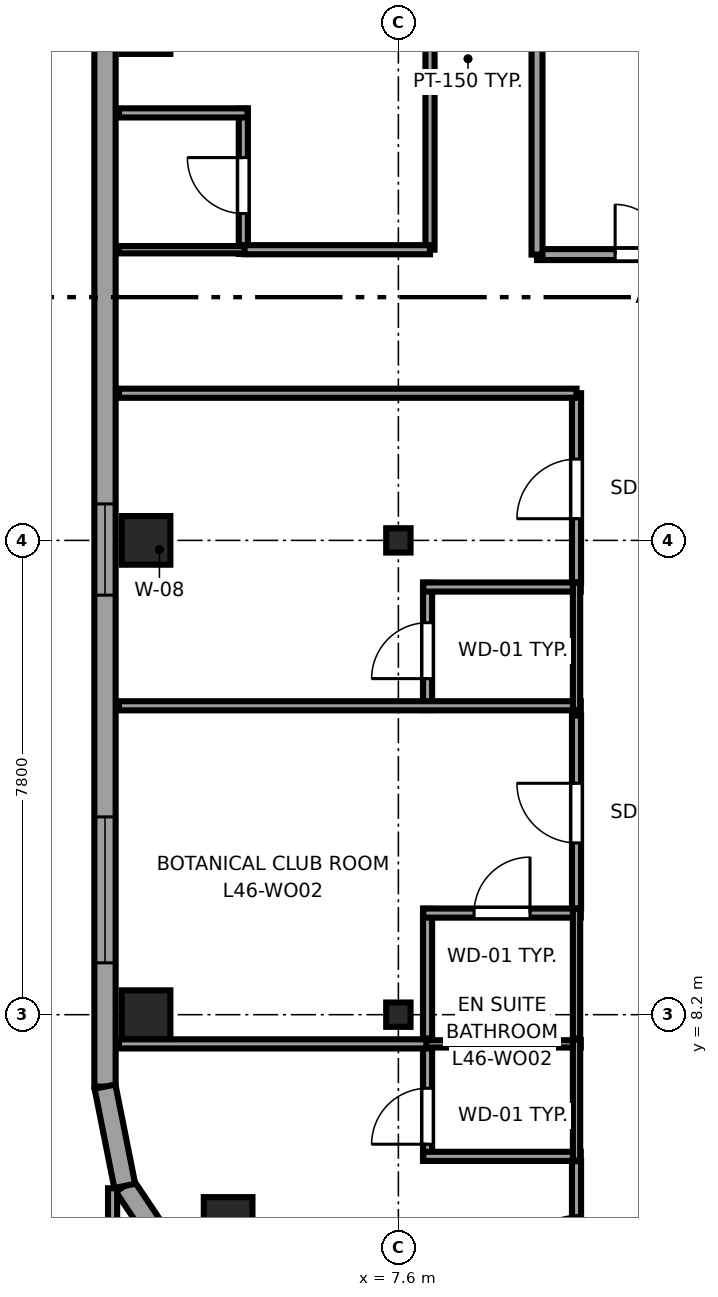
"""IFC4 building model, lengths in metres.
Left out: names, types, materials, properties, quantities, classifications, styles, units other than length and angle.
Written with IfcOpenShell. Run it as: python <this file> out.ifc"""

import sys

from ifc_helpers import new_model, si_unit, direction, frame, frame_2d, origin, origin_2d, place, context, subcontext, project, spatial, rectangle, i_section, extrude, source, transform, mapped, element, fill, save


model = new_model("IFC4")
c1 = context("Model", 3, precision=1e-05, world=origin(), true_north=direction((0.0, 1.0)))
c2 = subcontext(c1, "Body", "Model", "MODEL_VIEW")
j1 = project(units=[si_unit("LENGTHUNIT", "METRE"), si_unit("PLANEANGLEUNIT", "RADIAN")], contexts=[c1])
p1 = place(None, origin())
s1 = spatial("IfcSite", under=j1, at=p1, CompositionType="ELEMENT")
p2 = place(p1, origin())
s2 = spatial("IfcBuilding", under=s1, at=p2, CompositionType="ELEMENT")
p3 = place(p2, frame((0.0, 0.0, 175.45)))
s3 = spatial("IfcBuildingStorey", under=s2, at=p3, CompositionType="ELEMENT", Elevation=175.45)
m1 = source(origin(), c2, "Body", "SweptSolid", [
    extrude(rectangle(XDim=0.8, YDim=0.8, at=origin_2d()), origin(), (0.0, 0.0, 1.0), 3.55),
])
for number, where, z_axis, x_axis in (
    (1, (4.8, 4.8, 0.0), (0.0, 0.0, 1.0), (1.0, 0.0, 0.0)),
    (2, (3.45, 8.2, 0.0), (0.0, 0.0, 1.0), (1.0, 0.0, 0.0)),
    (3, (3.45, 16.0, 0.0), (0.0, 0.0, 1.0), (1.0, 0.0, 0.0)),
    (4, (3.45, 24.4, 0.0), (0.0, 0.0, 1.0), (1.0, 0.0, 0.0)),
):
    element("IfcColumn", number, at=place(p3, frame(where, z_axis=z_axis, x_axis=x_axis)), inside=s3, PredefinedType="COLUMN", context=c2, shape_type="MappedRepresentation", body=[
        mapped(m1, transform((0.0, 0.0, 0.0), x_axis=(1.0, 0.0, 0.0), y_axis=(0.0, 1.0, 0.0), z_axis=(0.0, 0.0, 1.0), scale=1.0)),
    ])
m2 = source(origin(), c2, "Body", "SweptSolid", [
    extrude(i_section(OverallWidth=0.4, OverallDepth=0.4, WebThickness=0.02, FlangeThickness=0.035, at=origin_2d()), origin(), (0.0, 0.0, 1.0), 3.55),
])
for number, where, z_axis, x_axis in (
    (5, (7.6, 8.2, 0.0), (0.0, 0.0, 1.0), (1.0, 0.0, 0.0)),
    (6, (7.6, 16.0, 0.0), (0.0, 0.0, 1.0), (1.0, 0.0, 0.0)),
):
    element("IfcColumn", number, at=place(p3, frame(where, z_axis=z_axis, x_axis=x_axis)), inside=s3, PredefinedType="COLUMN", context=c2, shape_type="MappedRepresentation", body=[
        mapped(m2, transform((0.0, 0.0, 0.0), x_axis=(1.0, 0.0, 0.0), y_axis=(0.0, 1.0, 0.0), z_axis=(0.0, 0.0, 1.0), scale=1.0)),
    ])
p4 = place(p3, frame((3.1, 5.385, 0.0), z_axis=(0.0, 0.0, 1.0), x_axis=(0.555623290322, -0.831434158098, 0.0)))
e7 = element("IfcWall", 7, at=p4, inside=s3, PredefinedType="SOLIDWALL", context=c2, shape_type="SweptSolid", body=[
    extrude(rectangle(XDim=1.647, YDim=0.35, at=frame_2d((0.824, 0.0))), origin(), (0.0, 0.0, 1.0), 2.832),
])
p5 = place(p3, frame((2.775, 41.583, 0.0), z_axis=(0.0, 0.0, 1.0), x_axis=(0.0, -1.0, 0.0)))
e8 = element("IfcWall", 8, at=p5, inside=s3, PredefinedType="SOLIDWALL", context=c2, shape_type="SweptSolid", body=[
    extrude(rectangle(XDim=34.566, YDim=0.35, at=frame_2d((17.283, 0.0))), origin(), (0.0, 0.0, 1.0), 3.37),
])
p6 = place(p5, frame((1.485, 0.0, 0.68)))
e9 = element("IfcOpeningElement", 9, at=p6, cuts=e8, PredefinedType="OPENING", context=c2, shape_type="SweptSolid", body=[
    extrude(rectangle(XDim=2.4, YDim=1.9, at=frame_2d((1.2, 0.95))), frame((0.0, 0.185, 0.0), z_axis=(0.0, -1.0, 0.0), x_axis=(1.0, 0.0, 0.0)), (0.0, 0.0, 1.0), 0.37),
])
p7 = place(p5, frame((9.827, 0.0, 0.68)))
e10 = element("IfcOpeningElement", 10, at=p7, cuts=e8, PredefinedType="OPENING", context=c2, shape_type="SweptSolid", body=[
    extrude(rectangle(XDim=2.4, YDim=1.9, at=frame_2d((1.2, 0.95))), frame((0.0, 0.185, 0.0), z_axis=(0.0, -1.0, 0.0), x_axis=(1.0, 0.0, 0.0)), (0.0, 0.0, 1.0), 0.37),
])
p8 = place(p5, frame((13.997, 0.0, 0.68)))
e11 = element("IfcOpeningElement", 11, at=p8, cuts=e8, PredefinedType="OPENING", context=c2, shape_type="SweptSolid", body=[
    extrude(rectangle(XDim=2.4, YDim=1.9, at=frame_2d((1.2, 0.95))), frame((0.0, 0.185, 0.0), z_axis=(0.0, -1.0, 0.0), x_axis=(1.0, 0.0, 0.0)), (0.0, 0.0, 1.0), 0.37),
])
p9 = place(p5, frame((30.13, 0.0, 0.68)))
e12 = element("IfcOpeningElement", 12, at=p9, cuts=e8, PredefinedType="OPENING", context=c2, shape_type="SweptSolid", body=[
    extrude(rectangle(XDim=2.4, YDim=1.9, at=frame_2d((1.2, 0.95))), frame((0.0, 0.185, 0.0), z_axis=(0.0, -1.0, 0.0), x_axis=(1.0, 0.0, 0.0)), (0.0, 0.0, 1.0), 0.37),
])
p10 = place(p5, frame((24.983, 0.0, 0.62)))
e13 = element("IfcOpeningElement", 13, at=p10, cuts=e8, PredefinedType="OPENING", context=c2, shape_type="SweptSolid", body=[
    extrude(rectangle(XDim=1.5, YDim=1.55, at=frame_2d((0.75, 0.775))), frame((0.0, 0.185, 0.0), z_axis=(0.0, -1.0, 0.0), x_axis=(1.0, 0.0, 0.0)), (0.0, 0.0, 1.0), 0.37),
])
p11 = place(p3, frame((2.775, 7.017, 0.0), z_axis=(0.0, 0.0, 1.0), x_axis=(0.195072403631, -0.980788844421, 0.0)))
e14 = element("IfcWall", 14, at=p11, inside=s3, PredefinedType="SOLIDWALL", context=c2, shape_type="SweptSolid", body=[
    extrude(rectangle(XDim=1.665, YDim=0.35, at=frame_2d((0.832, 0.0))), origin(), (0.0, 0.0, 1.0), 3.37),
])
p12 = place(p3, frame((8.08, 5.8, 0.0), z_axis=(0.0, 0.0, 1.0), x_axis=(0.0, 1.0, 0.0)))
e15 = element("IfcWall", 15, at=p12, inside=s3, PredefinedType="PARTITIONING", context=c2, shape_type="SweptSolid", body=[
    extrude(rectangle(XDim=1.99, YDim=0.15, at=frame_2d((0.995, 0.0))), origin(), (0.0, 0.0, 1.0), 3.37),
])
p13 = place(p12, frame((0.27, 0.0, 0.0)))
e16 = element("IfcOpeningElement", 16, at=p13, cuts=e15, PredefinedType="OPENING", context=c2, shape_type="SweptSolid", body=[
    extrude(rectangle(XDim=0.92, YDim=2.01, at=frame_2d((0.46, 1.005))), frame((0.0, 0.085, 0.0), z_axis=(0.0, -1.0, 0.0), x_axis=(1.0, 0.0, 0.0)), (0.0, 0.0, 1.0), 0.17),
])
p14 = place(p3, frame((8.01, 5.87, 0.0), z_axis=(0.0, 0.0, 1.0), x_axis=(1.0, 0.0, 0.0)))
e17 = element("IfcWall", 17, at=p14, inside=s3, PredefinedType="PARTITIONING", context=c2, shape_type="SweptSolid", body=[
    extrude(rectangle(XDim=2.59, YDim=0.15, at=frame_2d((1.295, 0.0))), origin(), (0.0, 0.0, 1.0), 3.37),
])
p15 = place(p3, frame((8.01, 7.72, 0.0), z_axis=(0.0, 0.0, 1.0), x_axis=(1.0, 0.0, 0.0)))
e18 = element("IfcWall", 18, at=p15, inside=s3, PredefinedType="PLUMBINGWALL", context=c2, shape_type="SweptSolid", body=[
    extrude(rectangle(XDim=2.59, YDim=0.12, at=frame_2d((1.295, 0.0))), origin(), (0.0, 0.0, 1.0), 3.37),
])
p16 = place(p3, frame((10.53, 5.8, 0.0), z_axis=(0.0, 0.0, 1.0), x_axis=(0.0, 1.0, 0.0)))
e19 = element("IfcWall", 19, at=p16, inside=s3, PredefinedType="PLUMBINGWALL", context=c2, shape_type="SweptSolid", body=[
    extrude(rectangle(XDim=1.99, YDim=0.12, at=frame_2d((0.995, 0.0))), origin(), (0.0, 0.0, 1.0), 3.37),
])
p17 = place(p3, frame((8.08, 7.81, 0.0), z_axis=(0.0, 0.0, 1.0), x_axis=(0.0, 1.0, 0.0)))
e20 = element("IfcWall", 20, at=p17, inside=s3, PredefinedType="PARTITIONING", context=c2, shape_type="SweptSolid", body=[
    extrude(rectangle(XDim=2.131, YDim=0.15, at=frame_2d((1.065, 0.0))), origin(), (0.0, 0.0, 1.0), 3.37),
])
p18 = place(p3, frame((8.01, 9.871, 0.0), z_axis=(0.0, 0.0, 1.0), x_axis=(1.0, 0.0, 0.0)))
e21 = element("IfcWall", 21, at=p18, inside=s3, PredefinedType="PARTITIONING", context=c2, shape_type="SweptSolid", body=[
    extrude(rectangle(XDim=2.59, YDim=0.15, at=frame_2d((1.295, 0.0))), origin(), (0.0, 0.0, 1.0), 3.37),
])
p19 = place(p18, frame((0.835, 0.0, 0.0)))
e22 = element("IfcOpeningElement", 22, at=p19, cuts=e21, PredefinedType="OPENING", context=c2, shape_type="SweptSolid", body=[
    extrude(rectangle(XDim=0.92, YDim=2.01, at=frame_2d((0.46, 1.005))), frame((0.0, 0.085, 0.0), z_axis=(0.0, -1.0, 0.0), x_axis=(1.0, 0.0, 0.0)), (0.0, 0.0, 1.0), 0.17),
])
p20 = place(p3, frame((10.53, 7.81, 0.0), z_axis=(0.0, 0.0, 1.0), x_axis=(0.0, 1.0, 0.0)))
e23 = element("IfcWall", 23, at=p20, inside=s3, PredefinedType="PLUMBINGWALL", context=c2, shape_type="SweptSolid", body=[
    extrude(rectangle(XDim=2.131, YDim=0.12, at=frame_2d((1.065, 0.0))), origin(), (0.0, 0.0, 1.0), 3.37),
])
p21 = place(p3, frame((8.08, 13.21, 0.0), z_axis=(0.0, 0.0, 1.0), x_axis=(0.0, 1.0, 0.0)))
e24 = element("IfcWall", 24, at=p21, inside=s3, PredefinedType="PARTITIONING", context=c2, shape_type="SweptSolid", body=[
    extrude(rectangle(XDim=2.093, YDim=0.15, at=frame_2d((1.046, 0.0))), origin(), (0.0, 0.0, 1.0), 3.37),
])
p22 = place(p21, frame((0.517, 0.0, 0.0)))
e25 = element("IfcOpeningElement", 25, at=p22, cuts=e24, PredefinedType="OPENING", context=c2, shape_type="SweptSolid", body=[
    extrude(rectangle(XDim=0.92, YDim=2.01, at=frame_2d((0.46, 1.005))), frame((0.0, 0.085, 0.0), z_axis=(0.0, -1.0, 0.0), x_axis=(1.0, 0.0, 0.0)), (0.0, 0.0, 1.0), 0.17),
])
p23 = place(p3, frame((3.005, 13.28, 0.0), z_axis=(0.0, 0.0, 1.0), x_axis=(1.0, 0.0, 0.0)))
e26 = element("IfcWall", 26, at=p23, inside=s3, PredefinedType="PARTITIONING", context=c2, shape_type="SweptSolid", body=[
    extrude(rectangle(XDim=7.595, YDim=0.15, at=frame_2d((3.798, 0.0))), origin(), (0.0, 0.0, 1.0), 3.37),
])
p24 = place(p3, frame((8.01, 15.233, 0.0), z_axis=(0.0, 0.0, 1.0), x_axis=(1.0, 0.0, 0.0)))
e27 = element("IfcWall", 27, at=p24, inside=s3, PredefinedType="PARTITIONING", context=c2, shape_type="SweptSolid", body=[
    extrude(rectangle(XDim=2.59, YDim=0.15, at=frame_2d((1.295, 0.0))), origin(), (0.0, 0.0, 1.0), 3.37),
])
p25 = place(p3, frame((10.53, 13.21, 0.0), z_axis=(0.0, 0.0, 1.0), x_axis=(0.0, 1.0, 0.0)))
e28 = element("IfcWall", 28, at=p25, inside=s3, PredefinedType="PLUMBINGWALL", context=c2, shape_type="SweptSolid", body=[
    extrude(rectangle(XDim=2.093, YDim=0.12, at=frame_2d((1.046, 0.0))), origin(), (0.0, 0.0, 1.0), 3.37),
])
p26 = place(p3, frame((5.05, 20.71, 0.0), z_axis=(0.0, 0.0, 1.0), x_axis=(0.0, 1.0, 0.0)))
e29 = element("IfcWall", 29, at=p26, inside=s3, PredefinedType="PARTITIONING", context=c2, shape_type="SweptSolid", body=[
    extrude(rectangle(XDim=2.39, YDim=0.15, at=frame_2d((1.195, 0.0))), origin(), (0.0, 0.0, 1.0), 3.37),
])
p27 = place(p26, frame((0.665, 0.0, 0.0)))
e30 = element("IfcOpeningElement", 30, at=p27, cuts=e29, PredefinedType="OPENING", context=c2, shape_type="SweptSolid", body=[
    extrude(rectangle(XDim=0.92, YDim=2.01, at=frame_2d((0.46, 1.005))), frame((0.0, 0.085, 0.0), z_axis=(0.0, -1.0, 0.0), x_axis=(1.0, 0.0, 0.0)), (0.0, 0.0, 1.0), 0.17),
])
p28 = place(p3, frame((3.005, 20.78, 0.0), z_axis=(0.0, 0.0, 1.0), x_axis=(1.0, 0.0, 0.0)))
e31 = element("IfcWall", 31, at=p28, inside=s3, PredefinedType="PLUMBINGWALL", context=c2, shape_type="SweptSolid", body=[
    extrude(rectangle(XDim=2.115, YDim=0.12, at=frame_2d((1.058, 0.0))), origin(), (0.0, 0.0, 1.0), 3.37),
])
p29 = place(p3, frame((3.005, 23.03, 0.0), z_axis=(0.0, 0.0, 1.0), x_axis=(1.0, 0.0, 0.0)))
e32 = element("IfcWall", 32, at=p29, inside=s3, PredefinedType="PARTITIONING", context=c2, shape_type="SweptSolid", body=[
    extrude(rectangle(XDim=2.115, YDim=0.15, at=frame_2d((1.058, 0.0))), origin(), (0.0, 0.0, 1.0), 3.37),
])
p30 = place(p3, frame((10.53, 3.005, 0.0), z_axis=(0.0, 0.0, 1.0), x_axis=(0.0, 1.0, 0.0)))
e33 = element("IfcWall", 33, at=p30, inside=s3, PredefinedType="PARTITIONING", context=c2, shape_type="SweptSolid", body=[
    extrude(rectangle(XDim=2.785, YDim=0.15, at=frame_2d((1.393, 0.0))), origin(), (0.0, 0.0, 1.0), 3.37),
])
p31 = place(p30, frame((0.91, 0.0, 0.0)))
e34 = element("IfcOpeningElement", 34, at=p31, cuts=e33, PredefinedType="OPENING", context=c2, shape_type="SweptSolid", body=[
    extrude(rectangle(XDim=0.98, YDim=2.12, at=frame_2d((0.49, 1.06))), frame((0.0, 0.085, 0.0), z_axis=(0.0, -1.0, 0.0), x_axis=(1.0, 0.0, 0.0)), (0.0, 0.0, 1.0), 0.17),
])
p32 = place(p3, frame((3.005, 7.72, 0.0), z_axis=(0.0, 0.0, 1.0), x_axis=(1.0, 0.0, 0.0)))
e35 = element("IfcWall", 35, at=p32, inside=s3, PredefinedType="PARTITIONING", context=c2, shape_type="SweptSolid", body=[
    extrude(rectangle(XDim=5.055, YDim=0.15, at=frame_2d((2.528, 0.0))), origin(), (0.0, 0.0, 1.0), 3.37),
])
p33 = place(p3, frame((2.9, 3.08, 0.0), z_axis=(0.0, 0.0, 1.0), x_axis=(0.0, 1.0, 0.0)))
e36 = element("IfcWall", 36, at=p33, inside=s3, PredefinedType="PARTITIONING", context=c2, shape_type="SweptSolid", body=[
    extrude(rectangle(XDim=2.265, YDim=0.15, at=frame_2d((1.132, 0.0))), origin(), (0.0, 0.0, 1.0), 3.37),
])
p34 = place(p3, frame((10.53, 9.951, 0.0), z_axis=(0.0, 0.0, 1.0), x_axis=(0.0, 1.0, 0.0)))
e37 = element("IfcWall", 37, at=p34, inside=s3, PredefinedType="PARTITIONING", context=c2, shape_type="SweptSolid", body=[
    extrude(rectangle(XDim=3.169, YDim=0.15, at=frame_2d((1.584, 0.0))), origin(), (0.0, 0.0, 1.0), 3.37),
])
p35 = place(p34, frame((1.074, 0.0, 0.0)))
e38 = element("IfcOpeningElement", 38, at=p35, cuts=e37, PredefinedType="OPENING", context=c2, shape_type="SweptSolid", body=[
    extrude(rectangle(XDim=0.98, YDim=2.12, at=frame_2d((0.49, 1.06))), frame((0.0, 0.085, 0.0), z_axis=(0.0, -1.0, 0.0), x_axis=(1.0, 0.0, 0.0)), (0.0, 0.0, 1.0), 0.17),
])
p36 = place(p3, frame((10.53, 15.313, 0.0), z_axis=(0.0, 0.0, 1.0), x_axis=(0.0, 1.0, 0.0)))
e39 = element("IfcWall", 39, at=p36, inside=s3, PredefinedType="PARTITIONING", context=c2, shape_type="SweptSolid", body=[
    extrude(rectangle(XDim=3.107, YDim=0.15, at=frame_2d((1.553, 0.0))), origin(), (0.0, 0.0, 1.0), 3.37),
])
p37 = place(p36, frame((1.043, 0.0, 0.0)))
e40 = element("IfcOpeningElement", 40, at=p37, cuts=e39, PredefinedType="OPENING", context=c2, shape_type="SweptSolid", body=[
    extrude(rectangle(XDim=0.98, YDim=2.12, at=frame_2d((0.49, 1.06))), frame((0.0, 0.085, 0.0), z_axis=(0.0, -1.0, 0.0), x_axis=(1.0, 0.0, 0.0)), (0.0, 0.0, 1.0), 0.17),
])
p38 = place(p3, frame((3.005, 18.42, 0.0), z_axis=(0.0, 0.0, 1.0), x_axis=(1.0, 0.0, 0.0)))
e41 = element("IfcWall", 41, at=p38, inside=s3, PredefinedType="PARTITIONING", context=c2, shape_type="SweptSolid", body=[
    extrude(rectangle(XDim=7.525, YDim=0.15, at=frame_2d((3.763, 0.0))), origin(), (0.0, 0.0, 1.0), 3.37),
])
p39 = place(p3, frame((8.12, 20.78, 0.0), z_axis=(0.0, 0.0, 1.0), x_axis=(0.0, 1.0, 0.0)))
e42 = element("IfcWall", 42, at=p39, inside=s3, PredefinedType="PARTITIONING", context=c2, shape_type="SweptSolid", body=[
    extrude(rectangle(XDim=13.54, YDim=0.15, at=frame_2d((6.77, 0.0))), origin(), (0.0, 0.0, 1.0), 3.37),
])
p40 = place(p39, frame((6.28, 0.0, 0.0)))
e43 = element("IfcOpeningElement", 43, at=p40, cuts=e42, PredefinedType="OPENING", context=c2, shape_type="SweptSolid", body=[
    extrude(rectangle(XDim=0.98, YDim=2.12, at=frame_2d((0.49, 1.06))), frame((0.0, 0.085, 0.0), z_axis=(0.0, -1.0, 0.0), x_axis=(1.0, 0.0, 0.0)), (0.0, 0.0, 1.0), 0.17),
])
p41 = place(p3, frame((5.07, 20.78, 0.0), z_axis=(0.0, 0.0, 1.0), x_axis=(1.0, 0.0, 0.0)))
e44 = element("IfcWall", 44, at=p41, inside=s3, PredefinedType="PARTITIONING", context=c2, shape_type="SweptSolid", body=[
    extrude(rectangle(XDim=3.05, YDim=0.15, at=frame_2d((1.525, 0.0))), origin(), (0.0, 0.0, 1.0), 3.37),
])
p42 = place(p3, frame((9.88, 20.7, 0.0), z_axis=(0.0, 0.0, 1.0), x_axis=(1.0, 0.0, 0.0)))
e45 = element("IfcWall", 45, at=p42, inside=s3, PredefinedType="PARTITIONING", context=c2, shape_type="SweptSolid", body=[
    extrude(rectangle(XDim=4.22, YDim=0.18, at=frame_2d((2.11, 0.0))), origin(), (0.0, 0.0, 1.0), 3.37),
])
p43 = place(p42, frame((1.285, 0.0, 0.0)))
e46 = element("IfcOpeningElement", 46, at=p43, cuts=e45, PredefinedType="OPENING", context=c2, shape_type="SweptSolid", body=[
    extrude(rectangle(XDim=1.65, YDim=2.15, at=frame_2d((0.825, 1.075))), frame((0.0, 0.1, 0.0), z_axis=(0.0, -1.0, 0.0), x_axis=(1.0, 0.0, 0.0)), (0.0, 0.0, 1.0), 0.2),
])
p44 = place(p3, frame((9.88, 20.7, 0.0), z_axis=(0.0, 0.0, 1.0), x_axis=(0.0, 1.0, 0.0)))
e47 = element("IfcWall", 47, at=p44, inside=s3, PredefinedType="PARTITIONING", context=c2, shape_type="SweptSolid", body=[
    extrude(rectangle(XDim=9.05, YDim=0.18, at=frame_2d((4.525, 0.0))), origin(), (0.0, 0.0, 1.0), 3.37),
])
m3 = source(origin(), c2, "Body", "SweptSolid", [
    extrude(rectangle(XDim=2.4, YDim=1.9, at=frame_2d((1.2, 0.95))), frame((0.0, 0.09, 0.0), z_axis=(0.0, -1.0, 0.0), x_axis=(1.0, 0.0, 0.0)), (0.0, 0.0, 1.0), 0.06),
])
p45 = place(p9, origin())
e48 = element("IfcWindow", 48, at=p45, inside=s3, PartitioningType="TRIPLE_PANEL_HORIZONTAL", PredefinedType="WINDOW", context=c2, shape_type="MappedRepresentation", body=[
    mapped(m3, transform((0.0, 0.0, 0.0), x_axis=(1.0, 0.0, 0.0), y_axis=(0.0, 1.0, 0.0), z_axis=(0.0, 0.0, 1.0), scale=1.0)),
])
fill(e12, e48)
m4 = source(origin(), c2, "Body", "SweptSolid", [
    extrude(rectangle(XDim=1.5, YDim=1.55, at=frame_2d((0.75, 0.775))), frame((0.0, 0.09, 0.0), z_axis=(0.0, -1.0, 0.0), x_axis=(1.0, 0.0, 0.0)), (0.0, 0.0, 1.0), 0.06),
])
p46 = place(p10, origin())
e49 = element("IfcWindow", 49, at=p46, inside=s3, PartitioningType="SINGLE_PANEL", PredefinedType="WINDOW", context=c2, shape_type="MappedRepresentation", body=[
    mapped(m4, transform((0.0, 0.0, 0.0), x_axis=(1.0, 0.0, 0.0), y_axis=(0.0, 1.0, 0.0), z_axis=(0.0, 0.0, 1.0), scale=1.0)),
])
fill(e13, e49)
m5 = source(origin(), c2, "Body", "SweptSolid", [
    extrude(rectangle(XDim=0.92, YDim=2.01, at=frame_2d((0.46, 1.005))), frame((0.0, 0.025, 0.0), z_axis=(0.0, -1.0, 0.0), x_axis=(1.0, 0.0, 0.0)), (0.0, 0.0, 1.0), 0.05),
])
p47 = place(p13, origin())
e50 = element("IfcDoor", 50, at=p47, inside=s3, OperationType="SINGLE_SWING_LEFT", PredefinedType="DOOR", context=c2, shape_type="MappedRepresentation", body=[
    mapped(m5, transform((0.0, 0.0, 0.0), x_axis=(1.0, 0.0, 0.0), y_axis=(0.0, 1.0, 0.0), z_axis=(0.0, 0.0, 1.0), scale=1.0)),
])
fill(e16, e50)
p48 = place(p19, origin())
e51 = element("IfcDoor", 51, at=p48, inside=s3, OperationType="SINGLE_SWING_RIGHT", PredefinedType="DOOR", context=c2, shape_type="MappedRepresentation", body=[
    mapped(m5, transform((0.0, 0.0, 0.0), x_axis=(1.0, 0.0, 0.0), y_axis=(0.0, 1.0, 0.0), z_axis=(0.0, 0.0, 1.0), scale=1.0)),
])
fill(e22, e51)
p49 = place(p22, origin())
e52 = element("IfcDoor", 52, at=p49, inside=s3, OperationType="SINGLE_SWING_LEFT", PredefinedType="DOOR", context=c2, shape_type="MappedRepresentation", body=[
    mapped(m5, transform((0.0, 0.0, 0.0), x_axis=(1.0, 0.0, 0.0), y_axis=(0.0, 1.0, 0.0), z_axis=(0.0, 0.0, 1.0), scale=1.0)),
])
fill(e25, e52)
p50 = place(p27, origin())
e53 = element("IfcDoor", 53, at=p50, inside=s3, OperationType="SINGLE_SWING_RIGHT", PredefinedType="DOOR", context=c2, shape_type="MappedRepresentation", body=[
    mapped(m5, transform((0.0, 0.0, 0.0), x_axis=(1.0, 0.0, 0.0), y_axis=(0.0, 1.0, 0.0), z_axis=(0.0, 0.0, 1.0), scale=1.0)),
])
fill(e30, e53)
m6 = source(origin(), c2, "Body", "SweptSolid", [
    extrude(rectangle(XDim=0.98, YDim=2.12, at=frame_2d((0.49, 1.06))), frame((0.0, 0.025, 0.0), z_axis=(0.0, -1.0, 0.0), x_axis=(1.0, 0.0, 0.0)), (0.0, 0.0, 1.0), 0.05),
])
p51 = place(p31, origin())
e54 = element("IfcDoor", 54, at=p51, inside=s3, OperationType="SINGLE_SWING_LEFT", PredefinedType="DOOR", context=c2, shape_type="MappedRepresentation", body=[
    mapped(m6, transform((0.0, 0.0, 0.0), x_axis=(1.0, 0.0, 0.0), y_axis=(0.0, 1.0, 0.0), z_axis=(0.0, 0.0, 1.0), scale=1.0)),
])
fill(e34, e54)
p52 = place(p35, origin())
e55 = element("IfcDoor", 55, at=p52, inside=s3, OperationType="SINGLE_SWING_RIGHT", PredefinedType="DOOR", context=c2, shape_type="MappedRepresentation", body=[
    mapped(m6, transform((0.0, 0.0, 0.0), x_axis=(1.0, 0.0, 0.0), y_axis=(0.0, 1.0, 0.0), z_axis=(0.0, 0.0, 1.0), scale=1.0)),
])
fill(e38, e55)
p53 = place(p37, origin())
e56 = element("IfcDoor", 56, at=p53, inside=s3, OperationType="SINGLE_SWING_LEFT", PredefinedType="DOOR", context=c2, shape_type="MappedRepresentation", body=[
    mapped(m6, transform((0.0, 0.0, 0.0), x_axis=(1.0, 0.0, 0.0), y_axis=(0.0, 1.0, 0.0), z_axis=(0.0, 0.0, 1.0), scale=1.0)),
])
fill(e40, e56)
m7 = source(origin(), c2, "Body", "SweptSolid", [
    extrude(rectangle(XDim=1.65, YDim=2.15, at=frame_2d((0.825, 1.075))), frame((0.0, 0.025, 0.0), z_axis=(0.0, -1.0, 0.0), x_axis=(1.0, 0.0, 0.0)), (0.0, 0.0, 1.0), 0.05),
])
p54 = place(p43, origin())
e57 = element("IfcDoor", 57, at=p54, inside=s3, OperationType="DOUBLE_DOOR_SINGLE_SWING", PredefinedType="DOOR", context=c2, shape_type="MappedRepresentation", body=[
    mapped(m7, transform((0.0, 0.0, 0.0), x_axis=(1.0, 0.0, 0.0), y_axis=(0.0, 1.0, 0.0), z_axis=(0.0, 0.0, 1.0), scale=1.0)),
])
fill(e46, e57)
save(model, sys.argv[1])
